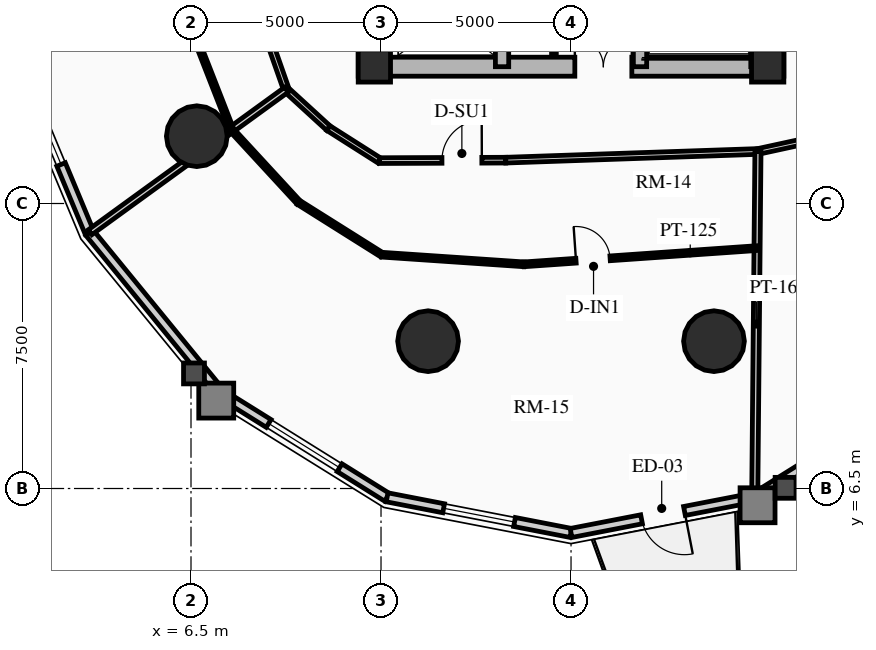
"""IFC4 building model, lengths in metres.
Left out: names, types, materials, properties, quantities, classifications, styles, units other than length and angle.
Written with IfcOpenShell. Run it as: python <this file> out.ifc"""

import sys

from ifc_helpers import new_model, si_unit, direction, frame, frame_2d, origin, origin_2d, place, context, subcontext, project, spatial, rectangle, circle, extrude, source, transform, mapped, element, fill, save


model = new_model("IFC4")
c1 = context("Model", 3, precision=1e-05, world=origin(), true_north=direction((0.0, 1.0)))
c2 = subcontext(c1, "Body", "Model", "MODEL_VIEW")
j1 = project(units=[si_unit("LENGTHUNIT", "METRE"), si_unit("PLANEANGLEUNIT", "RADIAN")], contexts=[c1])
p1 = place(None, origin())
s1 = spatial("IfcSite", under=j1, at=p1, CompositionType="ELEMENT")
p2 = place(p1, origin())
s2 = spatial("IfcBuilding", under=s1, at=p2, CompositionType="ELEMENT")
p3 = place(p2, frame((0.0, 0.0, 56.92)))
s3 = spatial("IfcBuildingStorey", under=s2, at=p3, CompositionType="ELEMENT", Elevation=56.92)
for number, where, z_axis, x_axis in (
    (1, (11.15, 17.35, 0.0), (0.0, 0.0, 1.0), (0.0, 1.0, 0.0)),
    (2, (21.85, 17.35, 0.0), (0.0, 0.0, 1.0), (0.0, 1.0, 0.0)),
):
    element("IfcWall", number, at=place(p3, frame(where, z_axis=z_axis, x_axis=x_axis)), inside=s3, PredefinedType="SHEAR", context=c2, shape_type="SweptSolid", body=[
        extrude(rectangle(XDim=14.3, YDim=0.5, at=frame_2d((7.15, 0.0))), origin(), (0.0, 0.0, 1.0), 2.91),
    ])
p4 = place(p3, frame((11.15, 17.6, 0.0), z_axis=(0.0, 0.0, 1.0), x_axis=(1.0, 0.0, 0.0)))
e3 = element("IfcWall", 3, at=p4, inside=s3, PredefinedType="SHEAR", context=c2, shape_type="SweptSolid", body=[
    extrude(rectangle(XDim=10.7, YDim=0.5, at=frame_2d((5.35, 0.0))), origin(), (0.0, 0.0, 1.0), 2.91),
])
m1 = source(origin(), c2, "Body", "SweptSolid", [
    extrude(rectangle(XDim=1.5, YDim=2.02, at=frame_2d((0.75, 1.01))), frame((0.0, 0.26, 0.0), z_axis=(0.0, -1.0, 0.0), x_axis=(1.0, 0.0, 0.0)), (0.0, 0.0, 1.0), 0.52),
])
p5 = place(p4, frame((5.45, 0.0, 0.0)))
e4 = element("IfcOpeningElement", 4, at=p5, cuts=e3, PredefinedType="OPENING", context=c2, shape_type="MappedRepresentation", body=[
    mapped(m1, transform((0.0, 0.0, 0.0), x_axis=(1.0, 0.0, 0.0), y_axis=(0.0, 1.0, 0.0), z_axis=(0.0, 0.0, 1.0), scale=1.0)),
])
p6 = place(p3, frame((14.685, 17.6, 0.0), z_axis=(0.0, 0.0, 1.0), x_axis=(0.0, 1.0, 0.0)))
e5 = element("IfcWall", 5, at=p6, inside=s3, PredefinedType="SHEAR", context=c2, shape_type="SweptSolid", body=[
    extrude(rectangle(XDim=13.8, YDim=0.35, at=frame_2d((6.9, 0.0))), origin(), (0.0, 0.0, 1.0), 2.91),
])
m2 = source(origin(), c2, "Body", "SweptSolid", [
    extrude(rectangle(XDim=1.1, YDim=2.015, at=frame_2d((0.55, 1.007))), frame((0.0, 0.185, 0.0), z_axis=(0.0, -1.0, 0.0), x_axis=(1.0, 0.0, 0.0)), (0.0, 0.0, 1.0), 0.37),
])
p7 = place(p6, frame((4.9, 0.0, 0.0)))
e6 = element("IfcOpeningElement", 6, at=p7, cuts=e5, PredefinedType="OPENING", context=c2, shape_type="MappedRepresentation", body=[
    mapped(m2, transform((0.0, 0.0, 0.0), x_axis=(1.0, 0.0, 0.0), y_axis=(0.0, 1.0, 0.0), z_axis=(0.0, 0.0, 1.0), scale=1.0)),
])
m3 = source(origin(), c2, "Body", "SweptSolid", [
    extrude(rectangle(XDim=1.15, YDim=2.02, at=frame_2d((0.575, 1.01))), frame((0.0, 0.185, 0.0), z_axis=(0.0, -1.0, 0.0), x_axis=(1.0, 0.0, 0.0)), (0.0, 0.0, 1.0), 0.37),
])
p8 = place(p6, frame((7.32, 0.0, 0.0)))
e7 = element("IfcOpeningElement", 7, at=p8, cuts=e5, PredefinedType="OPENING", context=c2, shape_type="MappedRepresentation", body=[
    mapped(m3, transform((0.0, 0.0, 0.0), x_axis=(1.0, 0.0, 0.0), y_axis=(0.0, 1.0, 0.0), z_axis=(0.0, 0.0, 1.0), scale=1.0)),
])
p9 = place(p3, frame((18.315, 17.6, 0.0), z_axis=(0.0, 0.0, 1.0), x_axis=(0.0, 1.0, 0.0)))
e8 = element("IfcWall", 8, at=p9, inside=s3, PredefinedType="SHEAR", context=c2, shape_type="SweptSolid", body=[
    extrude(rectangle(XDim=13.8, YDim=0.35, at=frame_2d((6.9, 0.0))), origin(), (0.0, 0.0, 1.0), 2.91),
])
p10 = place(p9, frame((10.025, 0.0, 0.0)))
e9 = element("IfcOpeningElement", 9, at=p10, cuts=e8, PredefinedType="OPENING", context=c2, shape_type="MappedRepresentation", body=[
    mapped(m2, transform((0.0, 0.0, 0.0), x_axis=(1.0, 0.0, 0.0), y_axis=(0.0, 1.0, 0.0), z_axis=(0.0, 0.0, 1.0), scale=1.0)),
])
p11 = place(p9, frame((12.025, 0.0, 0.0)))
e10 = element("IfcOpeningElement", 10, at=p11, cuts=e8, PredefinedType="OPENING", context=c2, shape_type="MappedRepresentation", body=[
    mapped(m2, transform((0.0, 0.0, 0.0), x_axis=(1.0, 0.0, 0.0), y_axis=(0.0, 1.0, 0.0), z_axis=(0.0, 0.0, 1.0), scale=1.0)),
])
p12 = place(p9, frame((5.33, 0.0, 0.0)))
e11 = element("IfcOpeningElement", 11, at=p12, cuts=e8, PredefinedType="OPENING", context=c2, shape_type="MappedRepresentation", body=[
    mapped(m3, transform((0.0, 0.0, 0.0), x_axis=(1.0, 0.0, 0.0), y_axis=(0.0, 1.0, 0.0), z_axis=(0.0, 0.0, 1.0), scale=1.0)),
])
p13 = place(p3, frame((21.405, 17.6, 0.0), z_axis=(0.0, 0.0, 1.0), x_axis=(0.0, 1.0, 0.0)))
e12 = element("IfcWall", 12, at=p13, inside=s3, PredefinedType="SHEAR", context=c2, shape_type="SweptSolid", body=[
    extrude(rectangle(XDim=6.745, YDim=0.35, at=frame_2d((3.373, 0.0))), origin(), (0.0, 0.0, 1.0), 2.91),
])
for number, where, z_axis, x_axis in (
    (13, (11.325, 17.62, 0.0), (0.0, 0.0, 1.0), (1.0, 0.0, 0.0)),
    (14, (21.675, 17.62, 0.0), (0.0, 0.0, 1.0), (1.0, 0.0, 0.0)),
):
    element("IfcColumn", number, at=place(p3, frame(where, z_axis=z_axis, x_axis=x_axis)), inside=s3, PredefinedType="COLUMN", context=c2, shape_type="SweptSolid", body=[
        extrude(rectangle(XDim=0.85, YDim=0.85, at=origin_2d()), origin(), (0.0, 0.0, 1.0), 2.91),
    ])
for number, where, z_axis, x_axis in (
    (15, (6.653, 15.771, 0.0), (0.0, 0.0, 1.0), (1.0, 0.0, 0.0)),
    (16, (12.739, 10.377, 0.0), (0.0, 0.0, 1.0), (1.0, 0.0, 0.0)),
    (17, (20.261, 10.377, 0.0), (0.0, 0.0, 1.0), (1.0, 0.0, 0.0)),
):
    element("IfcColumn", number, at=place(p3, frame(where, z_axis=z_axis, x_axis=x_axis)), inside=s3, PredefinedType="USERDEFINED", context=c2, shape_type="SweptSolid", body=[
        extrude(circle(Radius=0.8, at=origin_2d()), origin(), (0.0, 0.0, 1.0), 2.91),
    ])
p14 = place(p3, frame((3.828, 13.232, 0.0), z_axis=(0.0, 0.0, 1.0), x_axis=(-0.384348836956, 0.923187939442, 0.0)))
e18 = element("IfcWall", 18, at=p14, inside=s3, PredefinedType="SOLIDWALL", context=c2, shape_type="SweptSolid", body=[
    extrude(rectangle(XDim=5.789, YDim=0.24, at=frame_2d((2.894, 0.0))), origin(), (0.0, 0.0, 1.0), 2.073),
])
m4 = source(origin(), c2, "Body", "SweptSolid", [
    extrude(rectangle(XDim=1.9, YDim=1.35, at=frame_2d((0.95, 0.675))), frame((0.0, 0.13, 0.0), z_axis=(0.0, -1.0, 0.0), x_axis=(1.0, 0.0, 0.0)), (0.0, 0.0, 1.0), 0.26),
])
p15 = place(p14, frame((1.944, 0.0, 0.65)))
e19 = element("IfcOpeningElement", 19, at=p15, cuts=e18, PredefinedType="OPENING", context=c2, shape_type="MappedRepresentation", body=[
    mapped(m4, transform((0.0, 0.0, 0.0), x_axis=(1.0, 0.0, 0.0), y_axis=(0.0, 1.0, 0.0), z_axis=(0.0, 0.0, 1.0), scale=1.0)),
])
p16 = place(p3, frame((7.293, 8.991, 0.0), z_axis=(0.0, 0.0, 1.0), x_axis=(-0.632713287022, 0.77438614168, 0.0)))
e20 = element("IfcWall", 20, at=p16, inside=s3, PredefinedType="SOLIDWALL", context=c2, shape_type="SweptSolid", body=[
    extrude(rectangle(XDim=5.477, YDim=0.24, at=frame_2d((2.738, 0.0))), origin(), (0.0, 0.0, 1.0), 2.073),
])
p17 = place(p3, frame((11.66, 6.268, 0.0), z_axis=(0.0, 0.0, 1.0), x_axis=(-0.848533613342, 0.529141481107, 0.0)))
e21 = element("IfcWall", 21, at=p17, inside=s3, PredefinedType="SOLIDWALL", context=c2, shape_type="SweptSolid", body=[
    extrude(rectangle(XDim=5.146, YDim=0.24, at=frame_2d((2.573, 0.0))), origin(), (0.0, 0.0, 1.0), 2.073),
])
m5 = source(origin(), c2, "Body", "SweptSolid", [
    extrude(rectangle(XDim=2.2, YDim=1.35, at=frame_2d((1.1, 0.675))), frame((0.0, 0.13, 0.0), z_axis=(0.0, -1.0, 0.0), x_axis=(1.0, 0.0, 0.0)), (0.0, 0.0, 1.0), 0.26),
])
p18 = place(p17, frame((1.473, 0.0, 0.65)))
e22 = element("IfcOpeningElement", 22, at=p18, cuts=e21, PredefinedType="OPENING", context=c2, shape_type="MappedRepresentation", body=[
    mapped(m5, transform((0.0, 0.0, 0.0), x_axis=(1.0, 0.0, 0.0), y_axis=(0.0, 1.0, 0.0), z_axis=(0.0, 0.0, 1.0), scale=1.0)),
])
p19 = place(p3, frame((16.5, 5.33, 0.0), z_axis=(0.0, 0.0, 1.0), x_axis=(-0.981725274071, 0.190303668512, 0.0)))
e23 = element("IfcWall", 23, at=p19, inside=s3, PredefinedType="SOLIDWALL", context=c2, shape_type="SweptSolid", body=[
    extrude(rectangle(XDim=4.93, YDim=0.24, at=frame_2d((2.465, 0.0))), origin(), (0.0, 0.0, 1.0), 2.073),
])
p20 = place(p19, frame((1.515, 0.0, 0.65)))
e24 = element("IfcOpeningElement", 24, at=p20, cuts=e23, PredefinedType="OPENING", context=c2, shape_type="MappedRepresentation", body=[
    mapped(m4, transform((0.0, 0.0, 0.0), x_axis=(1.0, 0.0, 0.0), y_axis=(0.0, 1.0, 0.0), z_axis=(0.0, 0.0, 1.0), scale=1.0)),
])
p21 = place(p3, frame((21.34, 6.268, 0.0), z_axis=(0.0, 0.0, 1.0), x_axis=(-0.981725274071, -0.190303668512, 0.0)))
e25 = element("IfcWall", 25, at=p21, inside=s3, PredefinedType="SOLIDWALL", context=c2, shape_type="SweptSolid", body=[
    extrude(rectangle(XDim=4.93, YDim=0.24, at=frame_2d((2.465, 0.0))), origin(), (0.0, 0.0, 1.0), 2.073),
])
m6 = source(origin(), c2, "Body", "SweptSolid", [
    extrude(rectangle(XDim=1.15, YDim=2.005, at=frame_2d((0.575, 1.002))), frame((0.0, 0.13, 0.0), z_axis=(0.0, -1.0, 0.0), x_axis=(1.0, 0.0, 0.0)), (0.0, 0.0, 1.0), 0.26),
])
p22 = place(p21, frame((1.89, 0.0, 0.0)))
e26 = element("IfcOpeningElement", 26, at=p22, cuts=e25, PredefinedType="OPENING", context=c2, shape_type="MappedRepresentation", body=[
    mapped(m6, transform((0.0, 0.0, 0.0), x_axis=(1.0, 0.0, 0.0), y_axis=(0.0, 1.0, 0.0), z_axis=(0.0, 0.0, 1.0), scale=1.0)),
])
p23 = place(p3, frame((25.707, 8.991, 0.0), z_axis=(0.0, 0.0, 1.0), x_axis=(-0.848533613342, -0.529141481107, 0.0)))
e27 = element("IfcWall", 27, at=p23, inside=s3, PredefinedType="SOLIDWALL", context=c2, shape_type="SweptSolid", body=[
    extrude(rectangle(XDim=5.146, YDim=0.24, at=frame_2d((2.573, 0.0))), origin(), (0.0, 0.0, 1.0), 2.073),
])
p24 = place(p3, frame((16.05, 17.92, 0.0), z_axis=(0.0, 0.0, 1.0), x_axis=(0.0, 1.0, 0.0)))
e28 = element("IfcWall", 28, at=p24, inside=s3, PredefinedType="PARTITIONING", context=c2, shape_type="SweptSolid", body=[
    extrude(rectangle(XDim=1.8, YDim=0.125, at=frame_2d((0.9, 0.0))), origin(), (0.0, 0.0, 1.0), 2.635),
])
m7 = source(origin(), c2, "Body", "SweptSolid", [
    extrude(rectangle(XDim=0.9, YDim=2.005, at=frame_2d((0.45, 1.002))), frame((0.0, 0.073, 0.0), z_axis=(0.0, -1.0, 0.0), x_axis=(1.0, 0.0, 0.0)), (0.0, 0.0, 1.0), 0.145),
])
p25 = place(p24, frame((0.42, 0.0, 0.0)))
e29 = element("IfcOpeningElement", 29, at=p25, cuts=e28, PredefinedType="OPENING", context=c2, shape_type="MappedRepresentation", body=[
    mapped(m7, transform((0.0, 0.0, 0.0), x_axis=(1.0, 0.0, 0.0), y_axis=(0.0, 1.0, 0.0), z_axis=(0.0, 0.0, 1.0), scale=1.0)),
])
p26 = place(p3, frame((8.538, 18.338, 0.0), z_axis=(0.0, 0.0, 1.0), x_axis=(0.331358150167, -0.94350504838, 0.0)))
e30 = element("IfcWall", 30, at=p26, inside=s3, PredefinedType="PARTITIONING", context=c2, shape_type="SweptSolid", body=[
    extrude(rectangle(XDim=1.424, YDim=0.15, at=frame_2d((0.712, 0.0))), origin(), (0.0, 0.0, 1.0), 2.205),
])
p27 = place(p3, frame((9.01, 16.994, 0.0), z_axis=(0.0, 0.0, 1.0), x_axis=(0.737701798986, -0.67512669609, 0.0)))
e31 = element("IfcWall", 31, at=p27, inside=s3, PredefinedType="PARTITIONING", context=c2, shape_type="SweptSolid", body=[
    extrude(rectangle(XDim=1.498, YDim=0.15, at=frame_2d((0.749, 0.0))), origin(), (0.0, 0.0, 1.0), 2.159),
])
p28 = place(p3, frame((10.115, 15.983, 0.0), z_axis=(0.0, 0.0, 1.0), x_axis=(0.843995849351, -0.536349705209, 0.0)))
e32 = element("IfcWall", 32, at=p28, inside=s3, PredefinedType="PARTITIONING", context=c2, shape_type="SweptSolid", body=[
    extrude(rectangle(XDim=1.593, YDim=0.15, at=frame_2d((0.796, 0.0))), origin(), (0.0, 0.0, 1.0), 2.205),
])
p29 = place(p3, frame((11.46, 15.129, 0.0), z_axis=(0.0, 0.0, 1.0), x_axis=(0.999993513287, 0.003601858435, 0.0)))
e33 = element("IfcWall", 33, at=p29, inside=s3, PredefinedType="PARTITIONING", context=c2, shape_type="SweptSolid", body=[
    extrude(rectangle(XDim=3.321, YDim=0.15, at=frame_2d((1.661, 0.0))), origin(), (0.0, 0.0, 1.0), 2.159),
])
m8 = source(origin(), c2, "Body", "SweptSolid", [
    extrude(rectangle(XDim=1.05, YDim=2.015, at=frame_2d((0.525, 1.007))), frame((0.0, 0.085, 0.0), z_axis=(0.0, -1.0, 0.0), x_axis=(1.0, 0.0, 0.0)), (0.0, 0.0, 1.0), 0.17),
])
p30 = place(p29, frame((1.643, 0.0, 0.0)))
e34 = element("IfcOpeningElement", 34, at=p30, cuts=e33, PredefinedType="OPENING", context=c2, shape_type="MappedRepresentation", body=[
    mapped(m8, transform((0.0, 0.0, 0.0), x_axis=(1.0, 0.0, 0.0), y_axis=(0.0, 1.0, 0.0), z_axis=(0.0, 0.0, 1.0), scale=1.0)),
])
p31 = place(p3, frame((14.781, 15.141, 0.0), z_axis=(0.0, 0.0, 1.0), x_axis=(0.999407918707, 0.034406569513, 0.0)))
e35 = element("IfcWall", 35, at=p31, inside=s3, PredefinedType="PARTITIONING", context=c2, shape_type="SweptSolid", body=[
    extrude(rectangle(XDim=6.642, YDim=0.15, at=frame_2d((3.321, 0.0))), origin(), (0.0, 0.0, 1.0), 2.159),
])
p32 = place(p3, frame((21.419, 15.369, 0.0), z_axis=(0.0, 0.0, 1.0), x_axis=(0.977192701953, 0.212354475464, 0.0)))
e36 = element("IfcWall", 36, at=p32, inside=s3, PredefinedType="PARTITIONING", context=c2, shape_type="SweptSolid", body=[
    extrude(rectangle(XDim=1.888, YDim=0.15, at=frame_2d((0.944, 0.0))), origin(), (0.0, 0.0, 1.0), 2.205),
])
p33 = place(p3, frame((9.01, 16.994, 0.0), z_axis=(0.0, 0.0, 1.0), x_axis=(-0.809215422166, -0.58751204288, 0.0)))
e37 = element("IfcWall", 37, at=p33, inside=s3, PredefinedType="PARTITIONING", context=c2, shape_type="SweptSolid", body=[
    extrude(rectangle(XDim=6.384, YDim=0.16, at=frame_2d((3.192, 0.0))), origin(), (0.0, 0.0, 1.0), 2.073),
])
p34 = place(p3, frame((21.419, 15.369, 0.0), z_axis=(0.0, 0.0, 1.0), x_axis=(-0.009327801925, -0.999956495109, 0.0)))
e38 = element("IfcWall", 38, at=p34, inside=s3, PredefinedType="PARTITIONING", context=c2, shape_type="SweptSolid", body=[
    extrude(rectangle(XDim=9.082, YDim=0.16, at=frame_2d((4.541, 0.0))), origin(), (0.0, 0.0, 1.0), 2.073),
])
p35 = place(p3, frame((6.602, 18.406, 0.0), z_axis=(0.0, 0.0, 1.0), x_axis=(0.363943166681, -0.931421156849, 0.0)))
e39 = element("IfcWall", 39, at=p35, inside=s3, PredefinedType="PARTITIONING", context=c2, shape_type="SweptSolid", body=[
    extrude(rectangle(XDim=2.644, YDim=0.125, at=frame_2d((1.322, 0.0))), origin(), (0.0, 0.0, 1.0), 2.159),
])
p36 = place(p3, frame((7.564, 15.944, 0.0), z_axis=(0.0, 0.0, 1.0), x_axis=(0.677781429023, -0.735263445624, 0.0)))
e40 = element("IfcWall", 40, at=p36, inside=s3, PredefinedType="PARTITIONING", context=c2, shape_type="SweptSolid", body=[
    extrude(rectangle(XDim=2.604, YDim=0.125, at=frame_2d((1.302, 0.0))), origin(), (0.0, 0.0, 1.0), 2.635),
])
p37 = place(p3, frame((9.329, 14.03, 0.0), z_axis=(0.0, 0.0, 1.0), x_axis=(0.846499184235, -0.532390017834, 0.0)))
e41 = element("IfcWall", 41, at=p37, inside=s3, PredefinedType="PARTITIONING", context=c2, shape_type="SweptSolid", body=[
    extrude(rectangle(XDim=2.586, YDim=0.125, at=frame_2d((1.293, 0.0))), origin(), (0.0, 0.0, 1.0), 2.205),
])
p38 = place(p3, frame((11.518, 12.653, 0.0), z_axis=(0.0, 0.0, 1.0), x_axis=(0.997709106843, -0.067650115472, 0.0)))
e42 = element("IfcWall", 42, at=p38, inside=s3, PredefinedType="PARTITIONING", context=c2, shape_type="SweptSolid", body=[
    extrude(rectangle(XDim=3.753, YDim=0.125, at=frame_2d((1.876, 0.0))), origin(), (0.0, 0.0, 1.0), 2.159),
])
p39 = place(p3, frame((15.262, 12.399, 0.0), z_axis=(0.0, 0.0, 1.0), x_axis=(0.997584901562, 0.069457643027, 0.0)))
e43 = element("IfcWall", 43, at=p39, inside=s3, PredefinedType="PARTITIONING", context=c2, shape_type="SweptSolid", body=[
    extrude(rectangle(XDim=6.148, YDim=0.125, at=frame_2d((3.074, 0.0))), origin(), (0.0, 0.0, 1.0), 2.159),
])
p40 = place(p39, frame((1.372, 0.0, 0.0)))
e44 = element("IfcOpeningElement", 44, at=p40, cuts=e43, PredefinedType="OPENING", context=c2, shape_type="MappedRepresentation", body=[
    mapped(m7, transform((0.0, 0.0, 0.0), x_axis=(1.0, 0.0, 0.0), y_axis=(0.0, 1.0, 0.0), z_axis=(0.0, 0.0, 1.0), scale=1.0)),
])
m9 = source(origin(), c2, "Body", "SweptSolid", [
    extrude(rectangle(XDim=1.9, YDim=1.35, at=frame_2d((0.95, 0.675))), frame((0.0, 0.03, 0.0), z_axis=(0.0, -1.0, 0.0), x_axis=(1.0, 0.0, 0.0)), (0.0, 0.0, 1.0), 0.06),
])
p41 = place(p15, origin())
e45 = element("IfcWindow", 45, at=p41, inside=s3, PartitioningType="DOUBLE_PANEL_VERTICAL", PredefinedType="WINDOW", context=c2, shape_type="MappedRepresentation", body=[
    mapped(m9, transform((0.0, 0.0, 0.0), x_axis=(1.0, 0.0, 0.0), y_axis=(0.0, 1.0, 0.0), z_axis=(0.0, 0.0, 1.0), scale=1.0)),
])
fill(e19, e45)
m10 = source(origin(), c2, "Body", "SweptSolid", [
    extrude(rectangle(XDim=2.2, YDim=1.35, at=frame_2d((1.1, 0.675))), frame((0.0, 0.03, 0.0), z_axis=(0.0, -1.0, 0.0), x_axis=(1.0, 0.0, 0.0)), (0.0, 0.0, 1.0), 0.06),
])
p42 = place(p18, origin())
e46 = element("IfcWindow", 46, at=p42, inside=s3, PartitioningType="DOUBLE_PANEL_VERTICAL", PredefinedType="WINDOW", context=c2, shape_type="MappedRepresentation", body=[
    mapped(m10, transform((0.0, 0.0, 0.0), x_axis=(1.0, 0.0, 0.0), y_axis=(0.0, 1.0, 0.0), z_axis=(0.0, 0.0, 1.0), scale=1.0)),
])
fill(e22, e46)
p43 = place(p20, origin())
e47 = element("IfcWindow", 47, at=p43, inside=s3, PartitioningType="DOUBLE_PANEL_VERTICAL", PredefinedType="WINDOW", context=c2, shape_type="MappedRepresentation", body=[
    mapped(m9, transform((0.0, 0.0, 0.0), x_axis=(1.0, 0.0, 0.0), y_axis=(0.0, 1.0, 0.0), z_axis=(0.0, 0.0, 1.0), scale=1.0)),
])
fill(e24, e47)
m11 = source(origin(), c2, "Body", "SweptSolid", [
    extrude(rectangle(XDim=1.15, YDim=2.005, at=frame_2d((0.575, 1.002))), frame((0.0, 0.025, 0.0), z_axis=(0.0, -1.0, 0.0), x_axis=(1.0, 0.0, 0.0)), (0.0, 0.0, 1.0), 0.05),
])
p44 = place(p22, origin())
e48 = element("IfcDoor", 48, at=p44, inside=s3, OperationType="SINGLE_SWING_LEFT", PredefinedType="DOOR", context=c2, shape_type="MappedRepresentation", body=[
    mapped(m11, transform((0.0, 0.0, 0.0), x_axis=(1.0, 0.0, 0.0), y_axis=(0.0, 1.0, 0.0), z_axis=(0.0, 0.0, 1.0), scale=1.0)),
])
fill(e26, e48)
m12 = source(origin(), c2, "Body", "SweptSolid", [
    extrude(rectangle(XDim=1.5, YDim=2.02, at=frame_2d((0.75, 1.01))), frame((0.0, 0.025, 0.0), z_axis=(0.0, -1.0, 0.0), x_axis=(1.0, 0.0, 0.0)), (0.0, 0.0, 1.0), 0.05),
])
p45 = place(p5, origin())
e49 = element("IfcDoor", 49, at=p45, inside=s3, OperationType="DOUBLE_DOOR_SINGLE_SWING", PredefinedType="DOOR", context=c2, shape_type="MappedRepresentation", body=[
    mapped(m12, transform((0.0, 0.0, 0.0), x_axis=(1.0, 0.0, 0.0), y_axis=(0.0, 1.0, 0.0), z_axis=(0.0, 0.0, 1.0), scale=1.0)),
])
fill(e4, e49)
m13 = source(origin(), c2, "Body", "SweptSolid", [
    extrude(rectangle(XDim=1.05, YDim=2.015, at=frame_2d((0.525, 1.007))), frame((0.0, 0.025, 0.0), z_axis=(0.0, -1.0, 0.0), x_axis=(1.0, 0.0, 0.0)), (0.0, 0.0, 1.0), 0.05),
])
p46 = place(p30, origin())
e50 = element("IfcDoor", 50, at=p46, inside=s3, OperationType="SINGLE_SWING_RIGHT", PredefinedType="DOOR", context=c2, shape_type="MappedRepresentation", body=[
    mapped(m13, transform((0.0, 0.0, 0.0), x_axis=(1.0, 0.0, 0.0), y_axis=(0.0, 1.0, 0.0), z_axis=(0.0, 0.0, 1.0), scale=1.0)),
])
fill(e34, e50)
m14 = source(origin(), c2, "Body", "SweptSolid", [
    extrude(rectangle(XDim=0.9, YDim=2.005, at=frame_2d((0.45, 1.002))), frame((0.0, 0.025, 0.0), z_axis=(0.0, -1.0, 0.0), x_axis=(1.0, 0.0, 0.0)), (0.0, 0.0, 1.0), 0.05),
])
p47 = place(p40, origin())
e51 = element("IfcDoor", 51, at=p47, inside=s3, OperationType="SINGLE_SWING_LEFT", PredefinedType="DOOR", context=c2, shape_type="MappedRepresentation", body=[
    mapped(m14, transform((0.0, 0.0, 0.0), x_axis=(1.0, 0.0, 0.0), y_axis=(0.0, 1.0, 0.0), z_axis=(0.0, 0.0, 1.0), scale=1.0)),
])
fill(e44, e51)
save(model, sys.argv[1])
